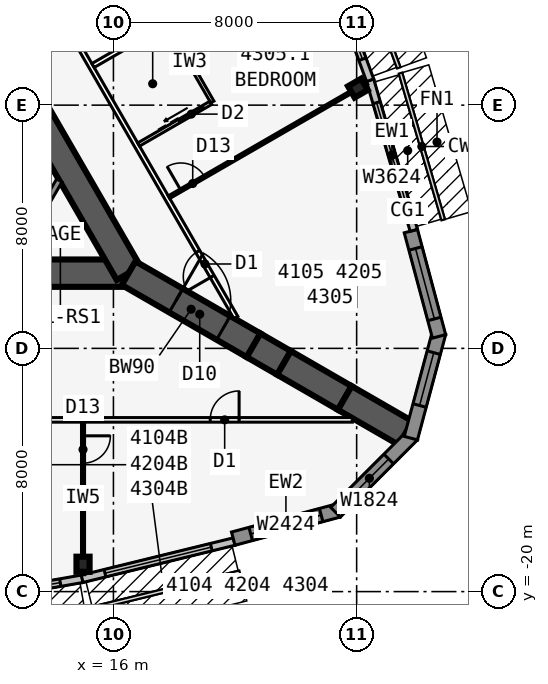
"""IFC4 building model, lengths in metres.
Left out: names, types, materials, properties, quantities, classifications, styles, units other than length and angle.
Written with IfcOpenShell. Run it as: python <this file> out.ifc"""

import sys

from ifc_helpers import new_model, si_unit, direction, frame, frame_2d, origin, origin_2d, place, context, subcontext, project, spatial, polyline, rectangle, i_section, outline, extrude, element, fill, save


model = new_model("IFC4")
c1 = context("Model", 3, precision=1e-05, world=origin(), true_north=direction((0.0, 1.0)))
c2 = subcontext(c1, "Body", "Model", "MODEL_VIEW")
j1 = project(units=[si_unit("LENGTHUNIT", "METRE"), si_unit("PLANEANGLEUNIT", "RADIAN")], contexts=[c1])
p1 = place(None, origin())
s1 = spatial("IfcSite", under=j1, at=p1, CompositionType="ELEMENT")
p2 = place(p1, origin())
s2 = spatial("IfcBuilding", under=s1, at=p2, CompositionType="ELEMENT")
p3 = place(p2, frame((0.0, 0.0, 155.5)))
s3 = spatial("IfcBuildingStorey", under=s2, at=p3, CompositionType="ELEMENT", Elevation=155.5)
p4 = place(p3, frame((-16.5, -9.526, 0.0), z_axis=(0.0, 0.0, 1.0), x_axis=(1.0, 0.0, 0.0)))
e1 = element("IfcWall", 1, at=p4, inside=s3, PredefinedType="SHEAR", context=c2, shape_type="SweptSolid", body=[
    extrude(rectangle(XDim=33.0, YDim=0.9, at=frame_2d((16.5, 0.0))), origin(), (0.0, 0.0, 1.0), 3.4),
])
p5 = place(p4, frame((14.05, 0.0, 0.0)))
e2 = element("IfcOpeningElement", 2, at=p5, cuts=e1, PredefinedType="OPENING", context=c2, shape_type="SweptSolid", body=[
    extrude(rectangle(XDim=1.8, YDim=2.13, at=frame_2d((0.9, 1.065))), frame((0.0, 0.46, 0.0), z_axis=(0.0, -1.0, 0.0), x_axis=(1.0, 0.0, 0.0)), (0.0, 0.0, 1.0), 0.92),
])
p6 = place(p3, frame((16.5, -9.526, 0.0), z_axis=(0.0, 0.0, 1.0), x_axis=(-0.499999749417, 0.866025548458, 0.0)))
e3 = element("IfcWall", 3, at=p6, inside=s3, PredefinedType="SHEAR", context=c2, shape_type="SweptSolid", body=[
    extrude(rectangle(XDim=33.0, YDim=0.9, at=frame_2d((16.5, 0.0))), origin(), (0.0, 0.0, 1.0), 3.4),
])
p7 = place(p6, frame((14.15, 0.0, 0.0)))
e4 = element("IfcOpeningElement", 4, at=p7, cuts=e3, PredefinedType="OPENING", context=c2, shape_type="SweptSolid", body=[
    extrude(rectangle(XDim=1.8, YDim=2.13, at=frame_2d((0.9, 1.065))), frame((0.0, 0.46, 0.0), z_axis=(0.0, -1.0, 0.0), x_axis=(1.0, 0.0, 0.0)), (0.0, 0.0, 1.0), 0.92),
])
p8 = place(p6, frame((12.6, 0.0, 0.0)))
e5 = element("IfcOpeningElement", 5, at=p8, cuts=e3, PredefinedType="OPENING", context=c2, shape_type="SweptSolid", body=[
    extrude(rectangle(XDim=1.0, YDim=2.13, at=frame_2d((0.5, 1.065))), frame((0.0, 0.46, 0.0), z_axis=(0.0, -1.0, 0.0), x_axis=(1.0, 0.0, 0.0)), (0.0, 0.0, 1.0), 0.92),
])
p9 = place(p3, frame((16.5, -9.526, 0.0), z_axis=(0.0, 0.0, 1.0), x_axis=(0.866031398331, -0.499989616998, 0.0)))
e6 = element("IfcWall", 6, at=p9, inside=s3, PredefinedType="SHEAR", context=c2, shape_type="SweptSolid", body=[
    extrude(rectangle(XDim=4.746, YDim=0.9, at=frame_2d((2.373, 0.0))), origin(), (0.0, 0.0, 1.0), 3.4),
])
p10 = place(p9, frame((1.8, 0.0, 0.0)))
e7 = element("IfcOpeningElement", 7, at=p10, cuts=e6, PredefinedType="OPENING", context=c2, shape_type="SweptSolid", body=[
    extrude(rectangle(XDim=1.8, YDim=2.13, at=frame_2d((0.9, 1.065))), frame((0.0, 0.46, 0.0), z_axis=(0.0, -1.0, 0.0), x_axis=(1.0, 0.0, 0.0)), (0.0, 0.0, 1.0), 0.92),
])
p11 = place(p3, frame((20.61, -11.899, 0.0), z_axis=(0.0, 0.0, 1.0), x_axis=(0.866009537788, -0.500027479704, 0.0)))
e8 = element("IfcWall", 8, at=p11, inside=s3, PredefinedType="SHEAR", context=c2, shape_type="SweptSolid", body=[
    extrude(rectangle(XDim=1.155, YDim=0.9, at=frame_2d((0.577, 0.0))), origin(), (0.0, 0.0, 1.0), 3.4),
])
for number, where, z_axis, x_axis in (
    (9, (21.61, -12.477, 0.0), (0.0, 0.0, 1.0), (0.866, -0.5, 0.0)),
    (10, (23.61, -13.631, 0.0), (0.0, 0.0, 1.0), (0.866, -0.5, 0.0)),
):
    element("IfcWall", number, at=place(p3, frame(where, z_axis=z_axis, x_axis=x_axis)), inside=s3, PredefinedType="SHEAR", context=c2, shape_type="SweptSolid", body=[
        extrude(rectangle(XDim=2.309, YDim=0.9, at=frame_2d((1.155, 0.0))), origin(), (0.0, 0.0, 1.0), 3.4),
    ])
for number, where, z_axis, x_axis in (
    (11, (15.0, -19.1, 0.0), (0.0, 0.0, 1.0), (1.0, 0.0, 0.0)),
    (12, (24.041, -3.44, 0.0), (0.0, 0.0, 1.0), (-0.5, 0.866, 0.0)),
):
    element("IfcColumn", number, at=place(p3, frame(where, z_axis=z_axis, x_axis=x_axis)), inside=s3, PredefinedType="COLUMN", context=c2, shape_type="SweptSolid", body=[
        extrude(i_section(OverallWidth=0.432, OverallDepth=0.498, WebThickness=0.056, FlangeThickness=0.089, at=origin_2d()), origin(), (0.0, 0.0, 1.0), 3.4),
    ])
p12 = place(p3, frame((9.979, -20.452, 0.0), z_axis=(0.0, 0.0, 1.0), x_axis=(0.985030467156, 0.172380331752, 0.0)))
e13 = element("IfcWall", 13, at=p12, inside=s3, PredefinedType="STANDARD", context=c2, shape_type="SweptSolid", body=[
    extrude(rectangle(XDim=5.076, YDim=0.25, at=frame_2d((2.538, 0.0))), origin(), (0.0, 0.0, 1.0), 3.235),
])
p13 = place(p12, frame((0.738, 0.0, 0.45)))
e14 = element("IfcOpeningElement", 14, at=p13, cuts=e13, PredefinedType="OPENING", context=c2, shape_type="SweptSolid", body=[
    extrude(rectangle(XDim=3.6, YDim=2.4, at=frame_2d((1.8, 1.2))), frame((0.0, 0.135, 0.0), z_axis=(0.0, -1.0, 0.0), x_axis=(1.0, 0.0, 0.0)), (0.0, 0.0, 1.0), 0.27),
])
p14 = place(p3, frame((14.97, -19.579, 0.0), z_axis=(0.0, 0.0, 1.0), x_axis=(0.971270024053, 0.237980126011, 0.0)))
e15 = element("IfcWall", 15, at=p14, inside=s3, PredefinedType="STANDARD", context=c2, shape_type="SweptSolid", body=[
    extrude(rectangle(XDim=5.148, YDim=0.25, at=frame_2d((2.574, 0.0))), origin(), (0.0, 0.0, 1.0), 3.235),
])
p15 = place(p14, frame((0.774, 0.0, 0.45)))
e16 = element("IfcOpeningElement", 16, at=p15, cuts=e15, PredefinedType="OPENING", context=c2, shape_type="SweptSolid", body=[
    extrude(rectangle(XDim=3.6, YDim=2.4, at=frame_2d((1.8, 1.2))), frame((0.0, 0.135, 0.0), z_axis=(0.0, -1.0, 0.0), x_axis=(1.0, 0.0, 0.0)), (0.0, 0.0, 1.0), 0.27),
])
p16 = place(p3, frame((19.942, -18.258, 0.0), z_axis=(0.0, 0.0, 1.0), x_axis=(0.965924653531, 0.258823421857, 0.0)))
e17 = element("IfcWall", 17, at=p16, inside=s3, PredefinedType="SOLIDWALL", context=c2, shape_type="SweptSolid", body=[
    extrude(rectangle(XDim=3.586, YDim=0.45, at=frame_2d((1.793, 0.0))), origin(), (0.0, 0.0, 1.0), 3.235),
])
p17 = place(p16, frame((0.593, 0.0, 0.45)))
e18 = element("IfcOpeningElement", 18, at=p17, cuts=e17, PredefinedType="OPENING", context=c2, shape_type="SweptSolid", body=[
    extrude(rectangle(XDim=2.4, YDim=2.4, at=frame_2d((1.2, 1.2))), frame((0.0, 0.235, 0.0), z_axis=(0.0, -1.0, 0.0), x_axis=(1.0, 0.0, 0.0)), (0.0, 0.0, 1.0), 0.47),
])
p18 = place(p3, frame((23.305, -17.388, 0.0), z_axis=(0.0, 0.0, 1.0), x_axis=(0.707106781187, 0.707106781187, 0.0)))
e19 = element("IfcWall", 19, at=p18, inside=s3, PredefinedType="SOLIDWALL", context=c2, shape_type="SweptSolid", body=[
    extrude(outline(polyline([(3.586, 0.225), (3.527, 0.225), (3.035, 0.093), (3.0, 0.225), (0.0, 0.225), (0.0, -0.225), (3.586, -0.225), (3.586, 0.225)])), origin(), (0.0, 0.0, 1.0), 3.235),
])
p19 = place(p18, frame((0.675, 0.0, 0.45)))
e20 = element("IfcOpeningElement", 20, at=p19, cuts=e19, PredefinedType="OPENING", context=c2, shape_type="SweptSolid", body=[
    extrude(rectangle(XDim=1.8, YDim=2.4, at=frame_2d((0.9, 1.2))), frame((0.0, 0.235, 0.0), z_axis=(0.0, -1.0, 0.0), x_axis=(1.0, 0.0, 0.0)), (0.0, 0.0, 1.0), 0.47),
])
p20 = place(p3, frame((25.783, -14.953, 0.0), z_axis=(0.0, 0.0, 1.0), x_axis=(0.258823421857, 0.965924653531, 0.0)))
e21 = element("IfcWall", 21, at=p20, inside=s3, PredefinedType="SOLIDWALL", context=c2, shape_type="SweptSolid", body=[
    extrude(outline(polyline([(3.586, 0.225), (0.586, 0.225), (0.551, 0.093), (0.06, 0.225), (0.0, 0.225), (0.0, -0.225), (3.586, -0.225), (3.586, 0.225)])), origin(), (0.0, 0.0, 1.0), 3.235),
])
p21 = place(p20, frame((1.111, 0.0, 0.45)))
e22 = element("IfcOpeningElement", 22, at=p21, cuts=e21, PredefinedType="OPENING", context=c2, shape_type="SweptSolid", body=[
    extrude(rectangle(XDim=1.8, YDim=2.4, at=frame_2d((0.9, 1.2))), frame((0.0, 0.235, 0.0), z_axis=(0.0, -1.0, 0.0), x_axis=(1.0, 0.0, 0.0)), (0.0, 0.0, 1.0), 0.47),
])
p22 = place(p3, frame((26.711, -11.605, 0.0), z_axis=(0.0, 0.0, 1.0), x_axis=(-0.258823421857, 0.965924653531, 0.0)))
e23 = element("IfcWall", 23, at=p22, inside=s3, PredefinedType="SOLIDWALL", context=c2, shape_type="SweptSolid", body=[
    extrude(rectangle(XDim=3.586, YDim=0.45, at=frame_2d((1.793, 0.0))), origin(), (0.0, 0.0, 1.0), 3.235),
])
p23 = place(p22, frame((0.593, 0.0, 0.45)))
e24 = element("IfcOpeningElement", 24, at=p23, cuts=e23, PredefinedType="OPENING", context=c2, shape_type="SweptSolid", body=[
    extrude(rectangle(XDim=2.4, YDim=2.4, at=frame_2d((1.2, 1.2))), frame((0.0, 0.235, 0.0), z_axis=(0.0, -1.0, 0.0), x_axis=(1.0, 0.0, 0.0)), (0.0, 0.0, 1.0), 0.47),
])
p24 = place(p3, frame((25.88, -8.118, 0.0), z_axis=(0.0, 0.0, 1.0), x_axis=(-0.279528287117, 0.960137457191, 0.0)))
e25 = element("IfcWall", 25, at=p24, inside=s3, PredefinedType="STANDARD", context=c2, shape_type="SweptSolid", body=[
    extrude(rectangle(XDim=5.148, YDim=0.25, at=frame_2d((2.574, 0.0))), origin(), (0.0, 0.0, 1.0), 3.235),
])
p25 = place(p24, frame((0.774, 0.0, 0.45)))
e26 = element("IfcOpeningElement", 26, at=p25, cuts=e25, PredefinedType="OPENING", context=c2, shape_type="SweptSolid", body=[
    extrude(rectangle(XDim=3.6, YDim=2.4, at=frame_2d((1.8, 1.2))), frame((0.0, 0.135, 0.0), z_axis=(0.0, -1.0, 0.0), x_axis=(1.0, 0.0, 0.0)), (0.0, 0.0, 1.0), 0.27),
])
p26 = place(p3, frame((24.444, -3.183, 0.0), z_axis=(0.0, 0.0, 1.0), x_axis=(-0.343225593282, 0.939252996863, 0.0)))
e27 = element("IfcWall", 27, at=p26, inside=s3, PredefinedType="STANDARD", context=c2, shape_type="SweptSolid", body=[
    extrude(rectangle(XDim=5.076, YDim=0.25, at=frame_2d((2.538, 0.0))), origin(), (0.0, 0.0, 1.0), 3.235),
])
p27 = place(p26, frame((0.738, 0.0, 0.45)))
e28 = element("IfcOpeningElement", 28, at=p27, cuts=e27, PredefinedType="OPENING", context=c2, shape_type="SweptSolid", body=[
    extrude(rectangle(XDim=3.6, YDim=2.4, at=frame_2d((1.8, 1.2))), frame((0.0, 0.135, 0.0), z_axis=(0.0, -1.0, 0.0), x_axis=(1.0, 0.0, 0.0)), (0.0, 0.0, 1.0), 0.27),
])
p28 = place(p3, frame((-23.857, -14.351, 0.0), z_axis=(0.0, 0.0, 1.0), x_axis=(1.0, 0.0, 0.0)))
e29 = element("IfcWall", 29, at=p28, inside=s3, PredefinedType="PARTITIONING", context=c2, shape_type="SweptSolid", body=[
    extrude(rectangle(XDim=47.714, YDim=0.15, at=frame_2d((23.857, 0.0))), origin(), (0.0, 0.0, 1.0), 3.235),
])
p29 = place(p28, frame((3.723, 0.0, 0.0)))
e30 = element("IfcOpeningElement", 30, at=p29, cuts=e29, PredefinedType="OPENING", context=c2, shape_type="SweptSolid", body=[
    extrude(rectangle(XDim=0.95, YDim=2.13, at=frame_2d((0.475, 1.065))), frame((0.0, 0.085, 0.0), z_axis=(0.0, -1.0, 0.0), x_axis=(1.0, 0.0, 0.0)), (0.0, 0.0, 1.0), 0.17),
])
p30 = place(p28, frame((17.082, 0.0, 0.0)))
e31 = element("IfcOpeningElement", 31, at=p30, cuts=e29, PredefinedType="OPENING", context=c2, shape_type="SweptSolid", body=[
    extrude(rectangle(XDim=0.95, YDim=2.13, at=frame_2d((0.475, 1.065))), frame((0.0, 0.085, 0.0), z_axis=(0.0, -1.0, 0.0), x_axis=(1.0, 0.0, 0.0)), (0.0, 0.0, 1.0), 0.17),
])
p31 = place(p28, frame((25.857, 0.0, 0.0)))
e32 = element("IfcOpeningElement", 32, at=p31, cuts=e29, PredefinedType="OPENING", context=c2, shape_type="SweptSolid", body=[
    extrude(rectangle(XDim=1.0, YDim=2.13, at=frame_2d((0.5, 1.065))), frame((0.0, 0.085, 0.0), z_axis=(0.0, -1.0, 0.0), x_axis=(1.0, 0.0, 0.0)), (0.0, 0.0, 1.0), 0.17),
])
p32 = place(p28, frame((30.282, 0.0, 0.0)))
e33 = element("IfcOpeningElement", 33, at=p32, cuts=e29, PredefinedType="OPENING", context=c2, shape_type="SweptSolid", body=[
    extrude(rectangle(XDim=0.95, YDim=2.13, at=frame_2d((0.475, 1.065))), frame((0.0, 0.085, 0.0), z_axis=(0.0, -1.0, 0.0), x_axis=(1.0, 0.0, 0.0)), (0.0, 0.0, 1.0), 0.17),
])
p33 = place(p28, frame((43.041, 0.0, 0.0)))
e34 = element("IfcOpeningElement", 34, at=p33, cuts=e29, PredefinedType="OPENING", context=c2, shape_type="SweptSolid", body=[
    extrude(rectangle(XDim=0.95, YDim=2.13, at=frame_2d((0.475, 1.065))), frame((0.0, 0.085, 0.0), z_axis=(0.0, -1.0, 0.0), x_axis=(1.0, 0.0, 0.0)), (0.0, 0.0, 1.0), 0.17),
])
p34 = place(p3, frame((15.0, -14.426, 0.0), z_axis=(0.0, 0.0, 1.0), x_axis=(0.0, -1.0, 0.0)))
e35 = element("IfcWall", 35, at=p34, inside=s3, PredefinedType="PARTITIONING", context=c2, shape_type="SweptSolid", body=[
    extrude(rectangle(XDim=5.017, YDim=0.1, at=frame_2d((2.508, 0.0))), origin(), (0.0, 0.0, 1.0), 2.389),
])
p35 = place(p34, frame((0.45, 0.0, 0.0)))
e36 = element("IfcOpeningElement", 36, at=p35, cuts=e35, PredefinedType="OPENING", context=c2, shape_type="SweptSolid", body=[
    extrude(rectangle(XDim=0.9, YDim=2.13, at=frame_2d((0.45, 1.065))), frame((0.0, 0.06, 0.0), z_axis=(0.0, -1.0, 0.0), x_axis=(1.0, 0.0, 0.0)), (0.0, 0.0, 1.0), 0.12),
])
p36 = place(p3, frame((20.027, -10.985, 0.0), z_axis=(0.0, 0.0, 1.0), x_axis=(-0.500001677587, 0.866024435227, 0.0)))
e37 = element("IfcWall", 37, at=p36, inside=s3, PredefinedType="PARTITIONING", context=c2, shape_type="SweptSolid", body=[
    extrude(rectangle(XDim=39.054, YDim=0.15, at=frame_2d((19.527, 0.0))), origin(), (0.0, 0.0, 1.0), 3.235),
])
p37 = place(p36, frame((1.558, 0.0, 0.0)))
e38 = element("IfcOpeningElement", 38, at=p37, cuts=e37, PredefinedType="OPENING", context=c2, shape_type="SweptSolid", body=[
    extrude(rectangle(XDim=0.95, YDim=2.13, at=frame_2d((0.475, 1.065))), frame((0.0, 0.085, 0.0), z_axis=(0.0, -1.0, 0.0), x_axis=(1.0, 0.0, 0.0)), (0.0, 0.0, 1.0), 0.17),
])
p38 = place(p36, frame((15.352, 0.0, 0.0)))
e39 = element("IfcOpeningElement", 39, at=p38, cuts=e37, PredefinedType="OPENING", context=c2, shape_type="SweptSolid", body=[
    extrude(rectangle(XDim=0.95, YDim=2.13, at=frame_2d((0.475, 1.065))), frame((0.0, 0.085, 0.0), z_axis=(0.0, -1.0, 0.0), x_axis=(1.0, 0.0, 0.0)), (0.0, 0.0, 1.0), 0.17),
])
p39 = place(p36, frame((22.752, 0.0, 0.0)))
e40 = element("IfcOpeningElement", 40, at=p39, cuts=e37, PredefinedType="OPENING", context=c2, shape_type="SweptSolid", body=[
    extrude(rectangle(XDim=0.95, YDim=2.13, at=frame_2d((0.475, 1.065))), frame((0.0, 0.085, 0.0), z_axis=(0.0, -1.0, 0.0), x_axis=(1.0, 0.0, 0.0)), (0.0, 0.0, 1.0), 0.17),
])
p40 = place(p36, frame((30.952, 0.0, 0.0)))
e41 = element("IfcOpeningElement", 41, at=p40, cuts=e37, PredefinedType="OPENING", context=c2, shape_type="SweptSolid", body=[
    extrude(rectangle(XDim=0.95, YDim=2.13, at=frame_2d((0.475, 1.065))), frame((0.0, 0.085, 0.0), z_axis=(0.0, -1.0, 0.0), x_axis=(1.0, 0.0, 0.0)), (0.0, 0.0, 1.0), 0.17),
])
p41 = place(p36, frame((37.752, 0.0, 0.0)))
e42 = element("IfcOpeningElement", 42, at=p41, cuts=e37, PredefinedType="OPENING", context=c2, shape_type="SweptSolid", body=[
    extrude(rectangle(XDim=0.95, YDim=2.13, at=frame_2d((0.475, 1.065))), frame((0.0, 0.085, 0.0), z_axis=(0.0, -1.0, 0.0), x_axis=(1.0, 0.0, 0.0)), (0.0, 0.0, 1.0), 0.17),
])
p42 = place(p3, frame((17.829, -7.027, 0.0), z_axis=(0.0, 0.0, 1.0), x_axis=(0.866029804378, 0.499992377871, 0.0)))
e43 = element("IfcWall", 43, at=p42, inside=s3, PredefinedType="PARTITIONING", context=c2, shape_type="SweptSolid", body=[
    extrude(rectangle(XDim=7.516, YDim=0.1, at=frame_2d((3.758, 0.0))), origin(), (0.0, 0.0, 1.0), 2.389),
])
p43 = place(p42, frame((0.45, 0.0, 0.0)))
e44 = element("IfcOpeningElement", 44, at=p43, cuts=e43, PredefinedType="OPENING", context=c2, shape_type="SweptSolid", body=[
    extrude(rectangle(XDim=0.9, YDim=2.13, at=frame_2d((0.45, 1.065))), frame((0.0, 0.06, 0.0), z_axis=(0.0, -1.0, 0.0), x_axis=(1.0, 0.0, 0.0)), (0.0, 0.0, 1.0), 0.12),
])
p44 = place(p3, frame((15.329, -2.697, 0.0), z_axis=(0.0, 0.0, 1.0), x_axis=(0.866024316602, 0.50000188305, 0.0)))
e45 = element("IfcWall", 45, at=p44, inside=s3, PredefinedType="PARTITIONING", context=c2, shape_type="SweptSolid", body=[
    extrude(rectangle(XDim=8.395, YDim=0.15, at=frame_2d((4.198, 0.0))), origin(), (0.0, 0.0, 1.0), 2.389),
])
p45 = place(p3, frame((19.253, -3.895, 0.0), z_axis=(0.0, 0.0, 1.0), x_axis=(-0.499990139034, 0.866031096941, 0.0)))
e46 = element("IfcWall", 46, at=p45, inside=s3, PredefinedType="PLUMBINGWALL", context=c2, shape_type="SweptSolid", body=[
    extrude(rectangle(XDim=3.0, YDim=0.12, at=frame_2d((1.5, 0.0))), origin(), (0.0, 0.0, 1.0), 3.235),
])
p46 = place(p3, frame((16.829, -5.295, 0.0), z_axis=(0.0, 0.0, 1.0), x_axis=(0.866035715982, 0.499982138324, 0.0)))
e47 = element("IfcWall", 47, at=p46, inside=s3, PredefinedType="PLUMBINGWALL", context=c2, shape_type="SweptSolid", body=[
    extrude(rectangle(XDim=2.74, YDim=0.12, at=frame_2d((1.37, 0.0))), origin(), (0.0, 0.0, 1.0), 3.235),
])
p47 = place(p46, frame((1.55, 0.0, 0.0)))
e48 = element("IfcOpeningElement", 48, at=p47, cuts=e47, PredefinedType="OPENING", context=c2, shape_type="SweptSolid", body=[
    extrude(rectangle(XDim=0.9, YDim=2.13, at=frame_2d((0.45, 1.065))), frame((0.0, 0.07, 0.0), z_axis=(0.0, -1.0, 0.0), x_axis=(1.0, 0.0, 0.0)), (0.0, 0.0, 1.0), 0.14),
])
p48 = place(p3, frame((14.219, -6.476, 0.0), z_axis=(0.0, 0.0, 1.0), x_axis=(-0.499952404951, -0.866052881055, 0.0)))
e49 = element("IfcWall", 49, at=p48, inside=s3, PredefinedType="SOLIDWALL", context=c2, shape_type="SweptSolid", body=[
    extrude(rectangle(XDim=3.002, YDim=0.2, at=frame_2d((1.501, 0.0))), origin(), (0.0, 0.0, 1.0), 3.235),
])
p49 = place(p13, origin())
e50 = element("IfcWindow", 50, at=p49, inside=s3, PartitioningType="SINGLE_PANEL", PredefinedType="WINDOW", context=c2, shape_type="SweptSolid", body=[
    extrude(rectangle(XDim=3.6, YDim=2.4, at=frame_2d((1.8, 1.2))), frame((0.0, 0.03, 0.0), z_axis=(0.0, -1.0, 0.0), x_axis=(1.0, 0.0, 0.0)), (0.0, 0.0, 1.0), 0.06),
])
fill(e14, e50)
p50 = place(p15, origin())
e51 = element("IfcWindow", 51, at=p50, inside=s3, PartitioningType="SINGLE_PANEL", PredefinedType="WINDOW", context=c2, shape_type="SweptSolid", body=[
    extrude(rectangle(XDim=3.6, YDim=2.4, at=frame_2d((1.8, 1.2))), frame((0.0, 0.03, 0.0), z_axis=(0.0, -1.0, 0.0), x_axis=(1.0, 0.0, 0.0)), (0.0, 0.0, 1.0), 0.06),
])
fill(e16, e51)
p51 = place(p17, origin())
e52 = element("IfcWindow", 52, at=p51, inside=s3, PartitioningType="SINGLE_PANEL", PredefinedType="WINDOW", context=c2, shape_type="SweptSolid", body=[
    extrude(rectangle(XDim=2.4, YDim=2.4, at=frame_2d((1.2, 1.2))), frame((0.0, 0.03, 0.0), z_axis=(0.0, -1.0, 0.0), x_axis=(1.0, 0.0, 0.0)), (0.0, 0.0, 1.0), 0.06),
])
fill(e18, e52)
p52 = place(p19, origin())
e53 = element("IfcWindow", 53, at=p52, inside=s3, PartitioningType="SINGLE_PANEL", PredefinedType="WINDOW", context=c2, shape_type="SweptSolid", body=[
    extrude(rectangle(XDim=1.8, YDim=2.4, at=frame_2d((0.9, 1.2))), frame((0.0, 0.03, 0.0), z_axis=(0.0, -1.0, 0.0), x_axis=(1.0, 0.0, 0.0)), (0.0, 0.0, 1.0), 0.06),
])
fill(e20, e53)
p53 = place(p21, origin())
e54 = element("IfcWindow", 54, at=p53, inside=s3, PartitioningType="SINGLE_PANEL", PredefinedType="WINDOW", context=c2, shape_type="SweptSolid", body=[
    extrude(rectangle(XDim=1.8, YDim=2.4, at=frame_2d((0.9, 1.2))), frame((0.0, 0.03, 0.0), z_axis=(0.0, -1.0, 0.0), x_axis=(1.0, 0.0, 0.0)), (0.0, 0.0, 1.0), 0.06),
])
fill(e22, e54)
p54 = place(p23, origin())
e55 = element("IfcWindow", 55, at=p54, inside=s3, PartitioningType="SINGLE_PANEL", PredefinedType="WINDOW", context=c2, shape_type="SweptSolid", body=[
    extrude(rectangle(XDim=2.4, YDim=2.4, at=frame_2d((1.2, 1.2))), frame((0.0, 0.03, 0.0), z_axis=(0.0, -1.0, 0.0), x_axis=(1.0, 0.0, 0.0)), (0.0, 0.0, 1.0), 0.06),
])
fill(e24, e55)
p55 = place(p25, origin())
e56 = element("IfcWindow", 56, at=p55, inside=s3, PartitioningType="SINGLE_PANEL", PredefinedType="WINDOW", context=c2, shape_type="SweptSolid", body=[
    extrude(rectangle(XDim=3.6, YDim=2.4, at=frame_2d((1.8, 1.2))), frame((0.0, 0.03, 0.0), z_axis=(0.0, -1.0, 0.0), x_axis=(1.0, 0.0, 0.0)), (0.0, 0.0, 1.0), 0.06),
])
fill(e26, e56)
p56 = place(p27, origin())
e57 = element("IfcWindow", 57, at=p56, inside=s3, PartitioningType="SINGLE_PANEL", PredefinedType="WINDOW", context=c2, shape_type="SweptSolid", body=[
    extrude(rectangle(XDim=3.6, YDim=2.4, at=frame_2d((1.8, 1.2))), frame((0.0, 0.03, 0.0), z_axis=(0.0, -1.0, 0.0), x_axis=(1.0, 0.0, 0.0)), (0.0, 0.0, 1.0), 0.06),
])
fill(e28, e57)
p57 = place(p35, origin())
e58 = element("IfcDoor", 58, at=p57, inside=s3, OperationType="SINGLE_SWING_LEFT", PredefinedType="DOOR", context=c2, shape_type="SweptSolid", body=[
    extrude(rectangle(XDim=0.9, YDim=2.13, at=frame_2d((0.45, 1.065))), frame((0.0, 0.025, 0.0), z_axis=(0.0, -1.0, 0.0), x_axis=(1.0, 0.0, 0.0)), (0.0, 0.0, 1.0), 0.05),
])
fill(e36, e58)
p58 = place(p33, origin())
e59 = element("IfcDoor", 59, at=p58, inside=s3, OperationType="SINGLE_SWING_RIGHT", PredefinedType="DOOR", context=c2, shape_type="SweptSolid", body=[
    extrude(rectangle(XDim=0.95, YDim=2.13, at=frame_2d((0.475, 1.065))), frame((0.0, 0.025, 0.0), z_axis=(0.0, -1.0, 0.0), x_axis=(1.0, 0.0, 0.0)), (0.0, 0.0, 1.0), 0.05),
])
fill(e34, e59)
p59 = place(p43, origin())
e60 = element("IfcDoor", 60, at=p59, inside=s3, OperationType="SINGLE_SWING_LEFT", PredefinedType="DOOR", context=c2, shape_type="SweptSolid", body=[
    extrude(rectangle(XDim=0.9, YDim=2.13, at=frame_2d((0.45, 1.065))), frame((0.0, 0.025, 0.0), z_axis=(0.0, -1.0, 0.0), x_axis=(1.0, 0.0, 0.0)), (0.0, 0.0, 1.0), 0.05),
])
fill(e44, e60)
p60 = place(p37, origin())
e61 = element("IfcDoor", 61, at=p60, inside=s3, OperationType="SINGLE_SWING_LEFT", PredefinedType="DOOR", context=c2, shape_type="SweptSolid", body=[
    extrude(rectangle(XDim=0.95, YDim=2.13, at=frame_2d((0.475, 1.065))), frame((0.0, 0.025, 0.0), z_axis=(0.0, -1.0, 0.0), x_axis=(1.0, 0.0, 0.0)), (0.0, 0.0, 1.0), 0.05),
])
fill(e38, e61)
p61 = place(p47, origin())
e62 = element("IfcDoor", 62, at=p61, inside=s3, OperationType="SLIDING_TO_LEFT", PredefinedType="DOOR", context=c2, shape_type="SweptSolid", body=[
    extrude(rectangle(XDim=0.9, YDim=2.13, at=frame_2d((0.45, 1.065))), frame((0.0, 0.025, 0.0), z_axis=(0.0, -1.0, 0.0), x_axis=(1.0, 0.0, 0.0)), (0.0, 0.0, 1.0), 0.05),
])
fill(e48, e62)
p62 = place(p10, origin())
e63 = element("IfcDoor", 63, at=p62, inside=s3, OperationType="DOUBLE_DOOR_DOUBLE_SWING", PredefinedType="DOOR", context=c2, shape_type="SweptSolid", body=[
    extrude(rectangle(XDim=1.8, YDim=2.13, at=frame_2d((0.9, 1.065))), frame((0.0, 0.025, 0.0), z_axis=(0.0, -1.0, 0.0), x_axis=(1.0, 0.0, 0.0)), (0.0, 0.0, 1.0), 0.05),
])
fill(e7, e63)
save(model, sys.argv[1])
